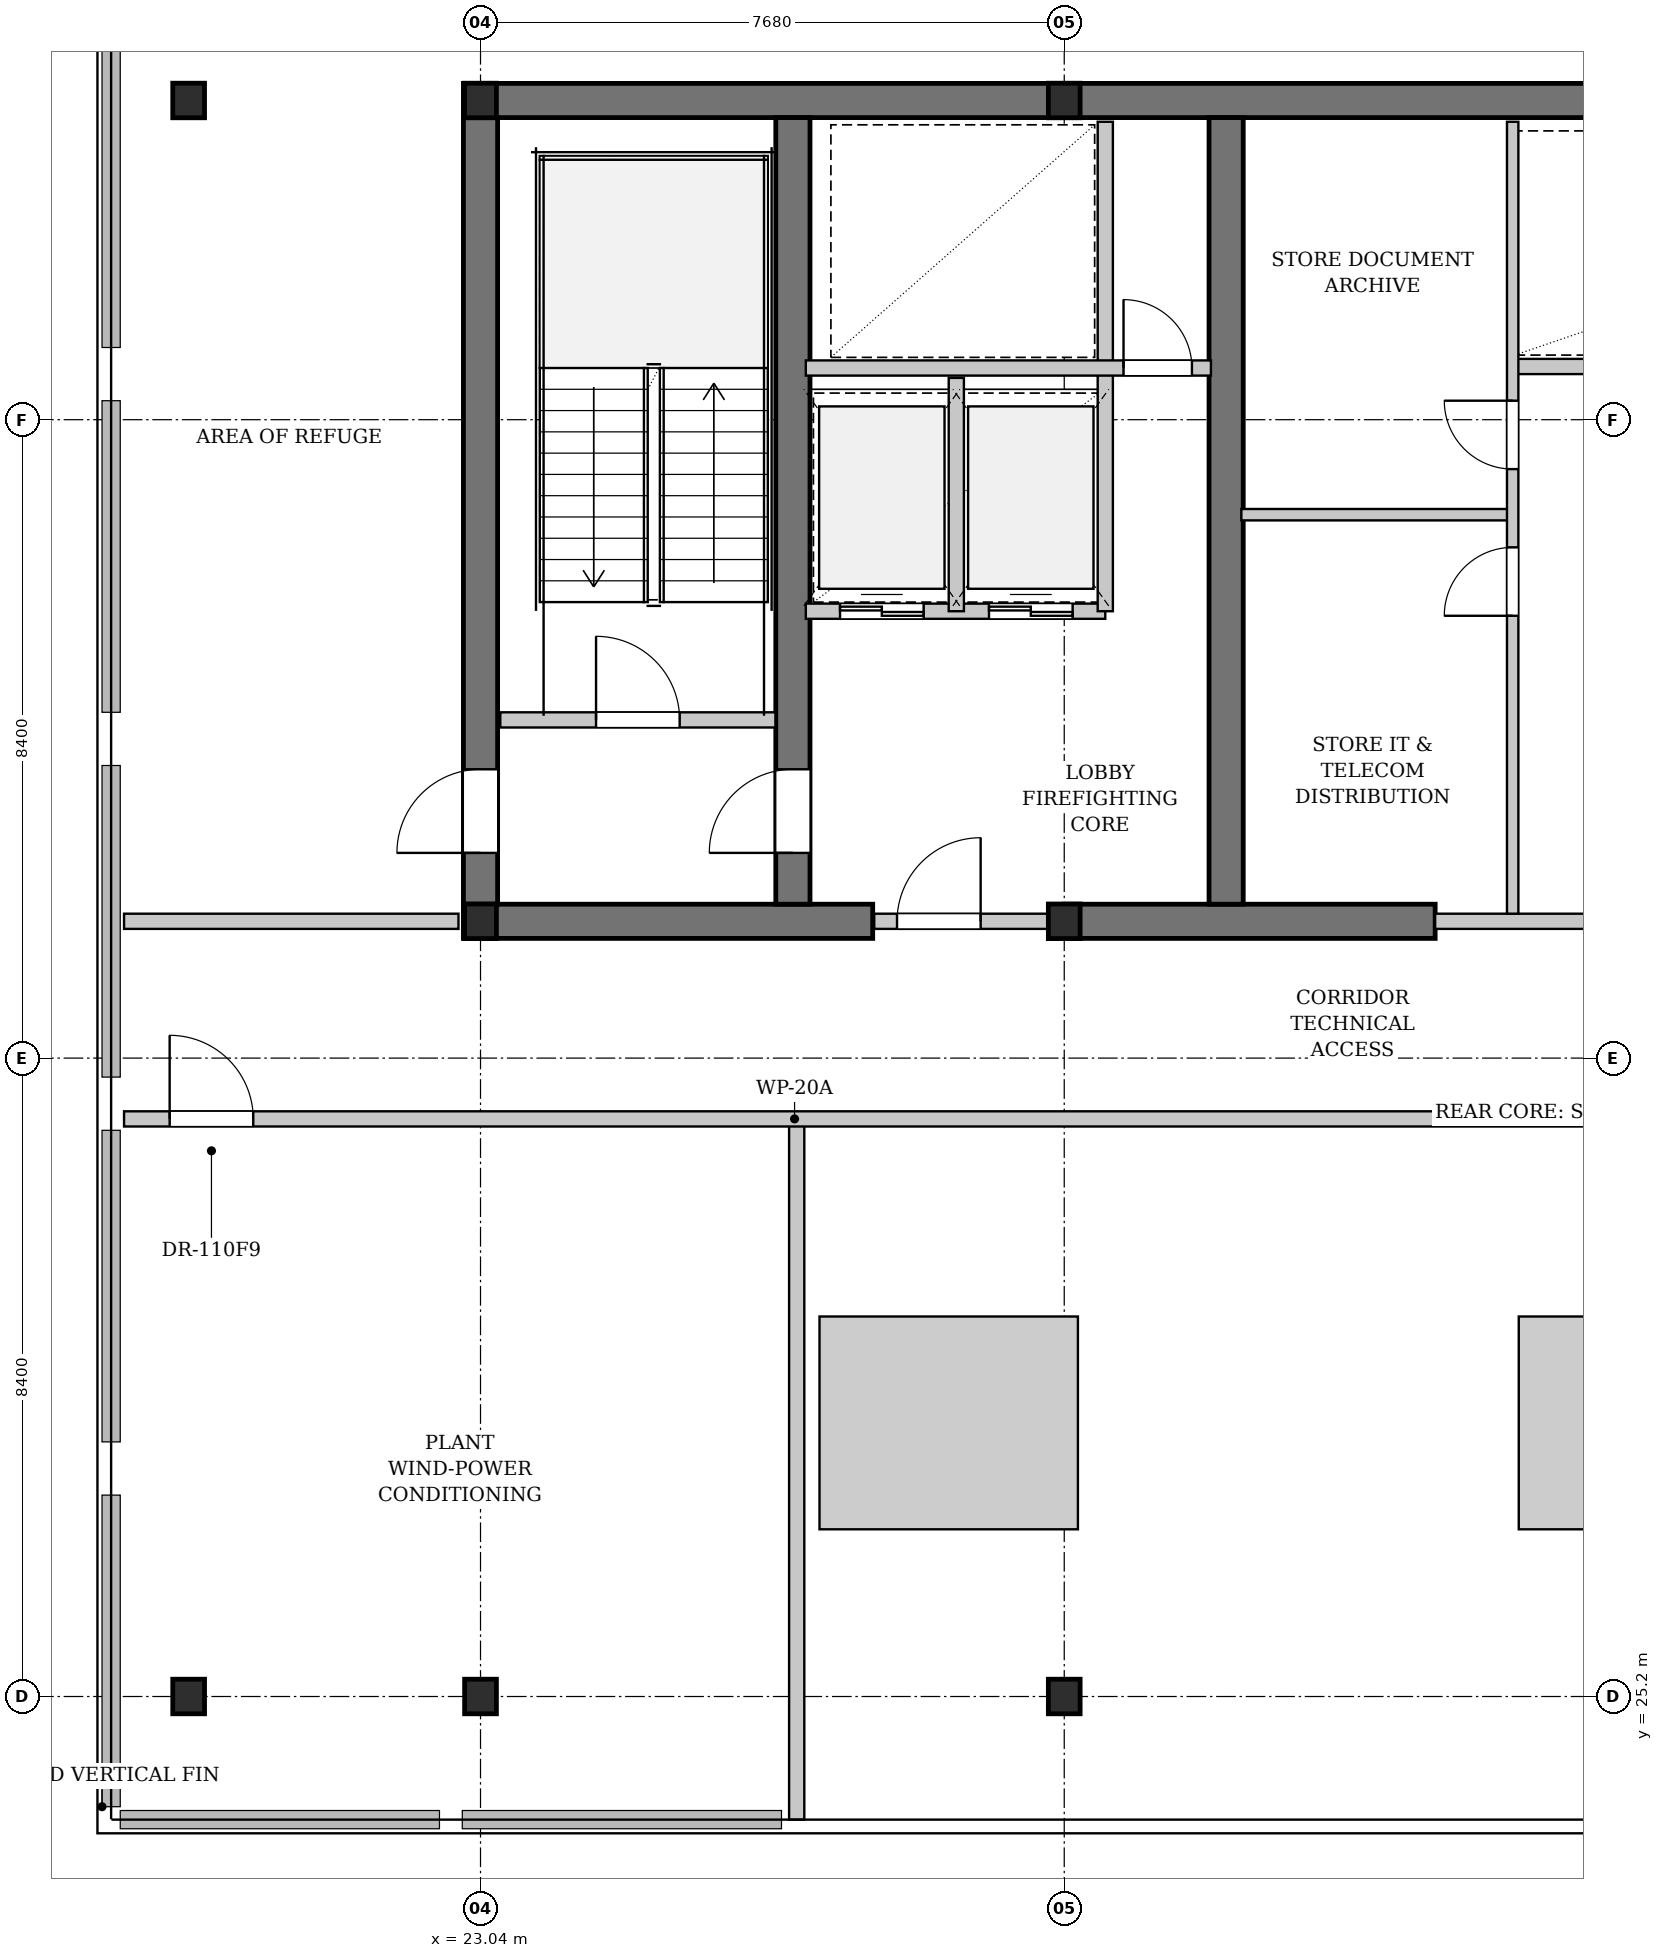
"""IFC4 building model, lengths in metres.
Left out: names, types, materials, properties, quantities, classifications, styles, units other than length and angle.
Written with IfcOpenShell. Run it as: python <this file> out.ifc"""

import sys

from ifc_helpers import new_model, si_unit, direction, frame, frame_2d, origin, origin_2d, place, context, subcontext, project, spatial, rectangle, i_section, extrude, element, fill, save


model = new_model("IFC4")
c1 = context("Model", 3, precision=1e-05, world=origin(), true_north=direction((0.0, 1.0)))
c2 = subcontext(c1, "Body", "Model", "MODEL_VIEW")
j1 = project(units=[si_unit("LENGTHUNIT", "METRE"), si_unit("PLANEANGLEUNIT", "RADIAN")], contexts=[c1])
p1 = place(None, origin())
s1 = spatial("IfcSite", under=j1, at=p1, CompositionType="ELEMENT")
p2 = place(p1, origin())
s2 = spatial("IfcBuilding", under=s1, at=p2, CompositionType="ELEMENT")
p3 = place(p2, frame((0.0, 0.0, 196.1)))
s3 = spatial("IfcBuildingStorey", under=s2, at=p3, CompositionType="ELEMENT", Elevation=196.1)
p4 = place(p3, frame((22.815, 46.2, 0.0), z_axis=(0.0, 0.0, 1.0), x_axis=(1.0, 0.0, 0.0)))
e1 = element("IfcWall", 1, at=p4, inside=s3, PredefinedType="SHEAR", context=c2, shape_type="SweptSolid", body=[
    extrude(rectangle(XDim=31.17, YDim=0.45, at=frame_2d((15.585, 0.0))), origin(), (0.0, 0.0, 1.0), 3.78),
])
p5 = place(p3, frame((22.815, 35.4, 0.0), z_axis=(0.0, 0.0, 1.0), x_axis=(1.0, 0.0, 0.0)))
e2 = element("IfcWall", 2, at=p5, inside=s3, PredefinedType="SHEAR", context=c2, shape_type="SweptSolid", body=[
    extrude(rectangle(XDim=5.385, YDim=0.45, at=frame_2d((2.692, 0.0))), origin(), (0.0, 0.0, 1.0), 3.78),
])
p6 = place(p3, frame((30.72, 35.4, 0.0), z_axis=(0.0, 0.0, 1.0), x_axis=(1.0, 0.0, 0.0)))
e3 = element("IfcWall", 3, at=p6, inside=s3, PredefinedType="SHEAR", context=c2, shape_type="SweptSolid", body=[
    extrude(rectangle(XDim=4.88, YDim=0.45, at=frame_2d((2.44, 0.0))), origin(), (0.0, 0.0, 1.0), 3.78),
])
p7 = place(p3, frame((23.04, 35.625, 0.0), z_axis=(0.0, 0.0, 1.0), x_axis=(0.0, 1.0, 0.0)))
e4 = element("IfcWall", 4, at=p7, inside=s3, PredefinedType="SHEAR", context=c2, shape_type="SweptSolid", body=[
    extrude(rectangle(XDim=10.35, YDim=0.45, at=frame_2d((5.175, 0.0))), origin(), (0.0, 0.0, 1.0), 3.78),
])
p8 = place(p7, frame((0.675, 0.0, 0.0)))
e5 = element("IfcOpeningElement", 5, at=p8, cuts=e4, PredefinedType="OPENING", context=c2, shape_type="SweptSolid", body=[
    extrude(rectangle(XDim=1.1, YDim=2.15, at=frame_2d((0.55, 1.075))), frame((0.0, 0.235, 0.0), z_axis=(0.0, -1.0, 0.0), x_axis=(1.0, 0.0, 0.0)), (0.0, 0.0, 1.0), 0.47),
])
p9 = place(p3, frame((27.15, 35.625, 0.0), z_axis=(0.0, 0.0, 1.0), x_axis=(0.0, 1.0, 0.0)))
e6 = element("IfcWall", 6, at=p9, inside=s3, PredefinedType="SHEAR", context=c2, shape_type="SweptSolid", body=[
    extrude(rectangle(XDim=10.35, YDim=0.45, at=frame_2d((5.175, 0.0))), origin(), (0.0, 0.0, 1.0), 3.78),
])
p10 = place(p9, frame((0.675, 0.0, 0.0)))
e7 = element("IfcOpeningElement", 7, at=p10, cuts=e6, PredefinedType="OPENING", context=c2, shape_type="SweptSolid", body=[
    extrude(rectangle(XDim=1.1, YDim=2.15, at=frame_2d((0.55, 1.075))), frame((0.0, 0.235, 0.0), z_axis=(0.0, -1.0, 0.0), x_axis=(1.0, 0.0, 0.0)), (0.0, 0.0, 1.0), 0.47),
])
p11 = place(p3, frame((32.85, 35.625, 0.0), z_axis=(0.0, 0.0, 1.0), x_axis=(0.0, 1.0, 0.0)))
e8 = element("IfcWall", 8, at=p11, inside=s3, PredefinedType="SHEAR", context=c2, shape_type="SweptSolid", body=[
    extrude(rectangle(XDim=10.35, YDim=0.45, at=frame_2d((5.175, 0.0))), origin(), (0.0, 0.0, 1.0), 3.78),
])
for number, where, z_axis, x_axis in (
    (9, (23.04, 35.4, 0.0), (0.0, 0.0, 1.0), (1.0, 0.0, 0.0)),
    (10, (23.04, 46.2, 0.0), (0.0, 0.0, 1.0), (1.0, 0.0, 0.0)),
    (11, (23.04, 25.2, 0.0), (0.0, 0.0, 1.0), (1.0, 0.0, 0.0)),
    (12, (30.72, 35.4, 0.0), (0.0, 0.0, 1.0), (1.0, 0.0, 0.0)),
    (13, (30.72, 46.2, 0.0), (0.0, 0.0, 1.0), (1.0, 0.0, 0.0)),
    (14, (30.72, 25.2, 0.0), (0.0, 0.0, 1.0), (1.0, 0.0, 0.0)),
    (15, (19.2, 25.2, 0.0), (0.0, 0.0, 1.0), (1.0, 0.0, 0.0)),
    (16, (19.2, 46.2, 0.0), (0.0, 0.0, 1.0), (1.0, 0.0, 0.0)),
):
    element("IfcColumn", number, at=place(p3, frame(where, z_axis=z_axis, x_axis=x_axis)), inside=s3, PredefinedType="COLUMN", context=c2, shape_type="SweptSolid", body=[
        extrude(i_section(OverallWidth=0.418, OverallDepth=0.455, WebThickness=0.042, FlangeThickness=0.068, FilletRadius=0.015, at=origin_2d()), origin(), (0.0, 0.0, 1.0), 4.2),
    ])
p12 = place(p3, frame((23.3, 38.05, 0.0), z_axis=(0.0, 0.0, 1.0), x_axis=(1.0, 0.0, 0.0)))
e17 = element("IfcWall", 17, at=p12, inside=s3, PredefinedType="PARTITIONING", context=c2, shape_type="SweptSolid", body=[
    extrude(rectangle(XDim=3.62, YDim=0.2, at=frame_2d((1.81, 0.0))), origin(), (0.0, 0.0, 1.0), 3.78),
])
p13 = place(p12, frame((1.26, 0.0, 0.0)))
e18 = element("IfcOpeningElement", 18, at=p13, cuts=e17, PredefinedType="OPENING", context=c2, shape_type="SweptSolid", body=[
    extrude(rectangle(XDim=1.1, YDim=2.15, at=frame_2d((0.55, 1.075))), frame((0.0, 0.11, 0.0), z_axis=(0.0, -1.0, 0.0), x_axis=(1.0, 0.0, 0.0)), (0.0, 0.0, 1.0), 0.22),
])
p14 = place(p3, frame((28.22, 35.4, 0.0), z_axis=(0.0, 0.0, 1.0), x_axis=(1.0, 0.0, 0.0)))
e19 = element("IfcWall", 19, at=p14, inside=s3, PredefinedType="PARTITIONING", context=c2, shape_type="SweptSolid", body=[
    extrude(rectangle(XDim=2.5, YDim=0.2, at=frame_2d((1.25, 0.0))), origin(), (0.0, 0.0, 1.0), 2.961),
])
p15 = place(p14, frame((0.3, 0.0, 0.0)))
e20 = element("IfcOpeningElement", 20, at=p15, cuts=e19, PredefinedType="OPENING", context=c2, shape_type="SweptSolid", body=[
    extrude(rectangle(XDim=1.1, YDim=2.15, at=frame_2d((0.55, 1.075))), frame((0.0, 0.11, 0.0), z_axis=(0.0, -1.0, 0.0), x_axis=(1.0, 0.0, 0.0)), (0.0, 0.0, 1.0), 0.22),
])
p16 = place(p3, frame((27.32, 39.48, 0.0), z_axis=(0.0, 0.0, 1.0), x_axis=(1.0, 0.0, 0.0)))
e21 = element("IfcWall", 21, at=p16, inside=s3, PredefinedType="PARTITIONING", context=c2, shape_type="SweptSolid", body=[
    extrude(rectangle(XDim=3.94, YDim=0.2, at=frame_2d((1.97, 0.0))), origin(), (0.0, 0.0, 1.0), 3.78),
])
p17 = place(p16, frame((0.45, 0.0, 0.0)))
e22 = element("IfcOpeningElement", 22, at=p17, cuts=e21, PredefinedType="OPENING", context=c2, shape_type="SweptSolid", body=[
    extrude(rectangle(XDim=1.1, YDim=2.2, at=frame_2d((0.55, 1.1))), frame((0.0, 0.11, 0.0), z_axis=(0.0, -1.0, 0.0), x_axis=(1.0, 0.0, 0.0)), (0.0, 0.0, 1.0), 0.22),
])
p18 = place(p16, frame((2.41, 0.0, 0.0)))
e23 = element("IfcOpeningElement", 23, at=p18, cuts=e21, PredefinedType="OPENING", context=c2, shape_type="SweptSolid", body=[
    extrude(rectangle(XDim=1.1, YDim=2.2, at=frame_2d((0.55, 1.1))), frame((0.0, 0.11, 0.0), z_axis=(0.0, -1.0, 0.0), x_axis=(1.0, 0.0, 0.0)), (0.0, 0.0, 1.0), 0.22),
])
p19 = place(p3, frame((29.3, 39.48, 0.0), z_axis=(0.0, 0.0, 1.0), x_axis=(0.0, 1.0, 0.0)))
e24 = element("IfcWall", 24, at=p19, inside=s3, PredefinedType="PARTITIONING", context=c2, shape_type="SweptSolid", body=[
    extrude(rectangle(XDim=3.07, YDim=0.2, at=frame_2d((1.535, 0.0))), origin(), (0.0, 0.0, 1.0), 3.78),
])
p20 = place(p3, frame((31.26, 39.48, 0.0), z_axis=(0.0, 0.0, 1.0), x_axis=(0.0, 1.0, 0.0)))
e25 = element("IfcWall", 25, at=p20, inside=s3, PredefinedType="PARTITIONING", context=c2, shape_type="SweptSolid", body=[
    extrude(rectangle(XDim=6.44, YDim=0.2, at=frame_2d((3.22, 0.0))), origin(), (0.0, 0.0, 1.0), 3.78),
])
p21 = place(p3, frame((27.32, 42.68, 0.0), z_axis=(0.0, 0.0, 1.0), x_axis=(1.0, 0.0, 0.0)))
e26 = element("IfcWall", 26, at=p21, inside=s3, PredefinedType="PARTITIONING", context=c2, shape_type="SweptSolid", body=[
    extrude(rectangle(XDim=5.33, YDim=0.2, at=frame_2d((2.665, 0.0))), origin(), (0.0, 0.0, 1.0), 3.78),
])
p22 = place(p21, frame((4.18, 0.0, 0.0)))
e27 = element("IfcOpeningElement", 27, at=p22, cuts=e26, PredefinedType="OPENING", context=c2, shape_type="SweptSolid", body=[
    extrude(rectangle(XDim=0.9, YDim=2.15, at=frame_2d((0.45, 1.075))), frame((0.0, 0.11, 0.0), z_axis=(0.0, -1.0, 0.0), x_axis=(1.0, 0.0, 0.0)), (0.0, 0.0, 1.0), 0.22),
])
p23 = place(p3, frame((35.6, 35.4, 0.0), z_axis=(0.0, 0.0, 1.0), x_axis=(1.0, 0.0, 0.0)))
e28 = element("IfcWall", 28, at=p23, inside=s3, PredefinedType="PARTITIONING", context=c2, shape_type="SweptSolid", body=[
    extrude(rectangle(XDim=6.5, YDim=0.2, at=frame_2d((3.25, 0.0))), origin(), (0.0, 0.0, 1.0), 2.961),
])
p24 = place(p23, frame((3.8, 0.0, 0.0)))
e29 = element("IfcOpeningElement", 29, at=p24, cuts=e28, PredefinedType="OPENING", context=c2, shape_type="SweptSolid", body=[
    extrude(rectangle(XDim=1.8, YDim=2.3, at=frame_2d((0.9, 1.15))), frame((0.0, 0.11, 0.0), z_axis=(0.0, -1.0, 0.0), x_axis=(1.0, 0.0, 0.0)), (0.0, 0.0, 1.0), 0.22),
])
p25 = place(p3, frame((36.6, 42.7, 0.0), z_axis=(0.0, 0.0, 1.0), x_axis=(1.0, 0.0, 0.0)))
e30 = element("IfcWall", 30, at=p25, inside=s3, PredefinedType="PARTITIONING", context=c2, shape_type="SweptSolid", body=[
    extrude(rectangle(XDim=5.25, YDim=0.2, at=frame_2d((2.625, 0.0))), origin(), (0.0, 0.0, 1.0), 3.78),
])
p26 = place(p3, frame((33.05, 40.75, 0.0), z_axis=(0.0, 0.0, 1.0), x_axis=(1.0, 0.0, 0.0)))
e31 = element("IfcWall", 31, at=p26, inside=s3, PredefinedType="PARTITIONING", context=c2, shape_type="SweptSolid", body=[
    extrude(rectangle(XDim=3.57, YDim=0.15, at=frame_2d((1.785, 0.0))), origin(), (0.0, 0.0, 1.0), 3.78),
])
p27 = place(p3, frame((36.62, 35.5, 0.0), z_axis=(0.0, 0.0, 1.0), x_axis=(0.0, 1.0, 0.0)))
e32 = element("IfcWall", 32, at=p27, inside=s3, PredefinedType="PARTITIONING", context=c2, shape_type="SweptSolid", body=[
    extrude(rectangle(XDim=10.42, YDim=0.15, at=frame_2d((5.21, 0.0))), origin(), (0.0, 0.0, 1.0), 3.78),
])
p28 = place(p27, frame((3.92, 0.0, 0.0)))
e33 = element("IfcOpeningElement", 33, at=p28, cuts=e32, PredefinedType="OPENING", context=c2, shape_type="SweptSolid", body=[
    extrude(rectangle(XDim=0.9, YDim=2.15, at=frame_2d((0.45, 1.075))), frame((0.0, 0.085, 0.0), z_axis=(0.0, -1.0, 0.0), x_axis=(1.0, 0.0, 0.0)), (0.0, 0.0, 1.0), 0.17),
])
p29 = place(p27, frame((5.85, 0.0, 0.0)))
e34 = element("IfcOpeningElement", 34, at=p29, cuts=e32, PredefinedType="OPENING", context=c2, shape_type="SweptSolid", body=[
    extrude(rectangle(XDim=0.9, YDim=2.15, at=frame_2d((0.45, 1.075))), frame((0.0, 0.085, 0.0), z_axis=(0.0, -1.0, 0.0), x_axis=(1.0, 0.0, 0.0)), (0.0, 0.0, 1.0), 0.17),
])
p30 = place(p3, frame((18.35, 35.4, 0.0), z_axis=(0.0, 0.0, 1.0), x_axis=(1.0, 0.0, 0.0)))
e35 = element("IfcWall", 35, at=p30, inside=s3, PredefinedType="PARTITIONING", context=c2, shape_type="SweptSolid", body=[
    extrude(rectangle(XDim=4.4, YDim=0.2, at=frame_2d((2.2, 0.0))), origin(), (0.0, 0.0, 1.0), 3.78),
])
p31 = place(p3, frame((27.2, 23.58, 0.0), z_axis=(0.0, 0.0, 1.0), x_axis=(0.0, 1.0, 0.0)))
e36 = element("IfcWall", 36, at=p31, inside=s3, PredefinedType="PARTITIONING", context=c2, shape_type="SweptSolid", body=[
    extrude(rectangle(XDim=9.22, YDim=0.2, at=frame_2d((4.61, 0.0))), origin(), (0.0, 0.0, 1.0), 3.78),
])
p32 = place(p3, frame((18.35, 32.8, 0.0), z_axis=(0.0, 0.0, 1.0), x_axis=(1.0, 0.0, 0.0)))
e37 = element("IfcWall", 37, at=p32, inside=s3, PredefinedType="PARTITIONING", context=c2, shape_type="SweptSolid", body=[
    extrude(rectangle(XDim=40.1, YDim=0.2, at=frame_2d((20.05, 0.0))), origin(), (0.0, 0.0, 1.0), 3.78),
])
p33 = place(p32, frame((0.6, 0.0, 0.0)))
e38 = element("IfcOpeningElement", 38, at=p33, cuts=e37, PredefinedType="OPENING", context=c2, shape_type="SweptSolid", body=[
    extrude(rectangle(XDim=1.1, YDim=2.15, at=frame_2d((0.55, 1.075))), frame((0.0, 0.11, 0.0), z_axis=(0.0, -1.0, 0.0), x_axis=(1.0, 0.0, 0.0)), (0.0, 0.0, 1.0), 0.22),
])
p34 = place(p32, frame((38.4, 0.0, 0.0)))
e39 = element("IfcOpeningElement", 39, at=p34, cuts=e37, PredefinedType="OPENING", context=c2, shape_type="SweptSolid", body=[
    extrude(rectangle(XDim=1.1, YDim=2.15, at=frame_2d((0.55, 1.075))), frame((0.0, 0.11, 0.0), z_axis=(0.0, -1.0, 0.0), x_axis=(1.0, 0.0, 0.0)), (0.0, 0.0, 1.0), 0.22),
])
p35 = place(p13, origin())
e40 = element("IfcDoor", 40, at=p35, inside=s3, OperationType="SINGLE_SWING_LEFT", PredefinedType="DOOR", context=c2, shape_type="SweptSolid", body=[
    extrude(rectangle(XDim=1.1, YDim=2.15, at=frame_2d((0.55, 1.075))), frame((0.0, 0.025, 0.0), z_axis=(0.0, -1.0, 0.0), x_axis=(1.0, 0.0, 0.0)), (0.0, 0.0, 1.0), 0.05),
])
fill(e18, e40)
p36 = place(p15, origin())
e41 = element("IfcDoor", 41, at=p36, inside=s3, OperationType="SINGLE_SWING_RIGHT", PredefinedType="DOOR", context=c2, shape_type="SweptSolid", body=[
    extrude(rectangle(XDim=1.1, YDim=2.15, at=frame_2d((0.55, 1.075))), frame((0.0, 0.025, 0.0), z_axis=(0.0, -1.0, 0.0), x_axis=(1.0, 0.0, 0.0)), (0.0, 0.0, 1.0), 0.05),
])
fill(e20, e41)
p37 = place(p17, origin())
e42 = element("IfcDoor", 42, at=p37, inside=s3, OperationType="DOUBLE_DOOR_SLIDING", PredefinedType="DOOR", context=c2, shape_type="SweptSolid", body=[
    extrude(rectangle(XDim=1.1, YDim=2.2, at=frame_2d((0.55, 1.1))), frame((0.0, 0.025, 0.0), z_axis=(0.0, -1.0, 0.0), x_axis=(1.0, 0.0, 0.0)), (0.0, 0.0, 1.0), 0.05),
])
fill(e22, e42)
p38 = place(p18, origin())
e43 = element("IfcDoor", 43, at=p38, inside=s3, OperationType="DOUBLE_DOOR_SLIDING", PredefinedType="DOOR", context=c2, shape_type="SweptSolid", body=[
    extrude(rectangle(XDim=1.1, YDim=2.2, at=frame_2d((0.55, 1.1))), frame((0.0, 0.025, 0.0), z_axis=(0.0, -1.0, 0.0), x_axis=(1.0, 0.0, 0.0)), (0.0, 0.0, 1.0), 0.05),
])
fill(e23, e43)
p39 = place(p22, origin())
e44 = element("IfcDoor", 44, at=p39, inside=s3, OperationType="SINGLE_SWING_LEFT", PredefinedType="DOOR", context=c2, shape_type="SweptSolid", body=[
    extrude(rectangle(XDim=0.9, YDim=2.15, at=frame_2d((0.45, 1.075))), frame((0.0, 0.025, 0.0), z_axis=(0.0, -1.0, 0.0), x_axis=(1.0, 0.0, 0.0)), (0.0, 0.0, 1.0), 0.05),
])
fill(e27, e44)
p40 = place(p28, origin())
e45 = element("IfcDoor", 45, at=p40, inside=s3, OperationType="SINGLE_SWING_LEFT", PredefinedType="DOOR", context=c2, shape_type="SweptSolid", body=[
    extrude(rectangle(XDim=0.9, YDim=2.15, at=frame_2d((0.45, 1.075))), frame((0.0, 0.025, 0.0), z_axis=(0.0, -1.0, 0.0), x_axis=(1.0, 0.0, 0.0)), (0.0, 0.0, 1.0), 0.05),
])
fill(e33, e45)
p41 = place(p29, origin())
e46 = element("IfcDoor", 46, at=p41, inside=s3, OperationType="SINGLE_SWING_RIGHT", PredefinedType="DOOR", context=c2, shape_type="SweptSolid", body=[
    extrude(rectangle(XDim=0.9, YDim=2.15, at=frame_2d((0.45, 1.075))), frame((0.0, 0.025, 0.0), z_axis=(0.0, -1.0, 0.0), x_axis=(1.0, 0.0, 0.0)), (0.0, 0.0, 1.0), 0.05),
])
fill(e34, e46)
p42 = place(p33, origin())
e47 = element("IfcDoor", 47, at=p42, inside=s3, OperationType="SINGLE_SWING_LEFT", PredefinedType="DOOR", context=c2, shape_type="SweptSolid", body=[
    extrude(rectangle(XDim=1.1, YDim=2.15, at=frame_2d((0.55, 1.075))), frame((0.0, 0.025, 0.0), z_axis=(0.0, -1.0, 0.0), x_axis=(1.0, 0.0, 0.0)), (0.0, 0.0, 1.0), 0.05),
])
fill(e38, e47)
p43 = place(p10, origin())
e48 = element("IfcDoor", 48, at=p43, inside=s3, OperationType="SINGLE_SWING_LEFT", PredefinedType="DOOR", context=c2, shape_type="SweptSolid", body=[
    extrude(rectangle(XDim=1.1, YDim=2.15, at=frame_2d((0.55, 1.075))), frame((0.0, 0.025, 0.0), z_axis=(0.0, -1.0, 0.0), x_axis=(1.0, 0.0, 0.0)), (0.0, 0.0, 1.0), 0.05),
])
fill(e7, e48)
p44 = place(p8, origin())
e49 = element("IfcDoor", 49, at=p44, inside=s3, OperationType="SINGLE_SWING_LEFT", PredefinedType="DOOR", context=c2, shape_type="SweptSolid", body=[
    extrude(rectangle(XDim=1.1, YDim=2.15, at=frame_2d((0.55, 1.075))), frame((0.0, 0.025, 0.0), z_axis=(0.0, -1.0, 0.0), x_axis=(1.0, 0.0, 0.0)), (0.0, 0.0, 1.0), 0.05),
])
fill(e5, e49)
save(model, sys.argv[1])
